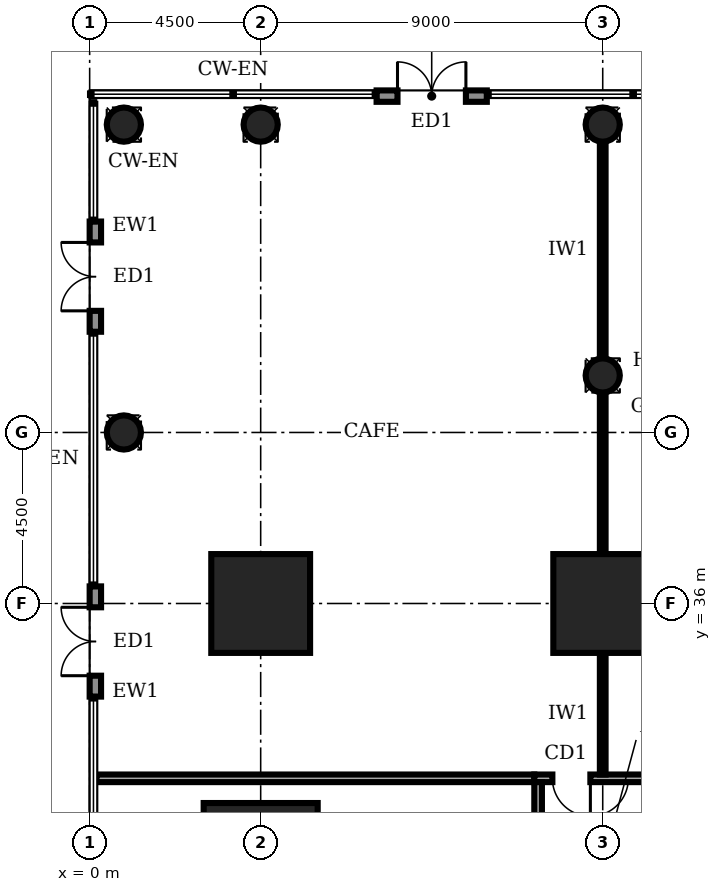
"""IFC4 building model, lengths in metres.
Left out: names, types, materials, properties, quantities, classifications, styles, units other than length and angle.
Written with IfcOpenShell. Run it as: python <this file> out.ifc"""

import sys

from ifc_helpers import new_model, si_unit, direction, frame, frame_2d, origin, origin_2d, place, context, subcontext, project, spatial, rectangle, circle, extrude, element, fill, save


model = new_model("IFC4")
c1 = context("Model", 3, precision=1e-05, world=origin(), true_north=direction((0.0, 1.0)))
c2 = subcontext(c1, "Body", "Model", "MODEL_VIEW")
j1 = project(units=[si_unit("LENGTHUNIT", "METRE"), si_unit("PLANEANGLEUNIT", "RADIAN")], contexts=[c1])
p1 = place(None, origin())
s1 = spatial("IfcSite", under=j1, at=p1, CompositionType="ELEMENT")
p2 = place(p1, origin())
s2 = spatial("IfcBuilding", under=s1, at=p2, CompositionType="ELEMENT")
p3 = place(p2, origin())
s3 = spatial("IfcBuildingStorey", under=s2, at=p3, CompositionType="ELEMENT", Elevation=0.0)
p4 = place(p3, frame((4.5, 29.25, -0.4), z_axis=(0.0, 0.0, 1.0), x_axis=(1.0, 0.0, 0.0)))
e1 = element("IfcColumn", 1, at=p4, inside=s3, PredefinedType="COLUMN", context=c2, shape_type="SweptSolid", body=[
    extrude(rectangle(XDim=3.0, YDim=3.0, at=origin_2d()), origin(), (0.0, 0.0, 1.0), 6.4),
])
for number, where, z_axis, x_axis in (
    (2, (4.5, 36.0, -0.4), (0.0, 0.0, 1.0), (1.0, 0.0, 0.0)),
    (3, (13.5, 36.0, -0.4), (0.0, 0.0, 1.0), (1.0, 0.0, 0.0)),
):
    element("IfcColumn", number, at=place(p3, frame(where, z_axis=z_axis, x_axis=x_axis)), inside=s3, PredefinedType="COLUMN", context=c2, shape_type="SweptSolid", body=[
        extrude(rectangle(XDim=2.6, YDim=2.6, at=origin_2d()), origin(), (0.0, 0.0, 1.0), 6.4),
    ])
for number, where, z_axis, x_axis in (
    (4, (0.9, 40.5, -0.4), (0.0, 0.0, 1.0), (1.0, 0.0, 0.0)),
    (5, (13.5, 42.0, -0.4), (0.0, 0.0, 1.0), (1.0, 0.0, 0.0)),
    (6, (0.9, 48.6, -0.4), (0.0, 0.0, 1.0), (1.0, 0.0, 0.0)),
    (7, (4.5, 48.6, -0.4), (0.0, 0.0, 1.0), (1.0, 0.0, 0.0)),
    (8, (13.5, 48.6, -0.4), (0.0, 0.0, 1.0), (1.0, 0.0, 0.0)),
):
    element("IfcColumn", number, at=place(p3, frame(where, z_axis=z_axis, x_axis=x_axis)), inside=s3, PredefinedType="COLUMN", context=c2, shape_type="SweptSolid", body=[
        extrude(circle(Radius=0.45, at=origin_2d()), origin(), (0.0, 0.0, 1.0), 6.4),
    ])
p5 = place(p3, frame((10.45, 49.35, 0.0), z_axis=(0.0, 0.0, 1.0), x_axis=(-1.0, 0.0, 0.0)))
e9 = element("IfcWall", 9, at=p5, inside=s3, PredefinedType="STANDARD", context=c2, shape_type="SweptSolid", body=[
    extrude(rectangle(XDim=2.9, YDim=0.3, at=frame_2d((1.45, 0.0))), origin(), (0.0, 0.0, 1.0), 5.7),
])
p6 = place(p5, frame((0.55, 0.0, 0.0)))
e10 = element("IfcOpeningElement", 10, at=p6, cuts=e9, PredefinedType="OPENING", context=c2, shape_type="SweptSolid", body=[
    extrude(rectangle(XDim=1.8, YDim=2.4, at=frame_2d((0.9, 1.2))), frame((0.0, 0.16, 0.0), z_axis=(0.0, -1.0, 0.0), x_axis=(1.0, 0.0, 0.0)), (0.0, 0.0, 1.0), 0.32),
])
p7 = place(p3, frame((0.15, 36.45, 0.0), z_axis=(0.0, 0.0, 1.0), x_axis=(0.0, -1.0, 0.0)))
e11 = element("IfcWall", 11, at=p7, inside=s3, PredefinedType="STANDARD", context=c2, shape_type="SweptSolid", body=[
    extrude(rectangle(XDim=2.9, YDim=0.3, at=frame_2d((1.45, 0.0))), origin(), (0.0, 0.0, 1.0), 5.7),
])
p8 = place(p7, frame((0.55, 0.0, 0.0)))
e12 = element("IfcOpeningElement", 12, at=p8, cuts=e11, PredefinedType="OPENING", context=c2, shape_type="SweptSolid", body=[
    extrude(rectangle(XDim=1.8, YDim=2.4, at=frame_2d((0.9, 1.2))), frame((0.0, 0.16, 0.0), z_axis=(0.0, -1.0, 0.0), x_axis=(1.0, 0.0, 0.0)), (0.0, 0.0, 1.0), 0.32),
])
p9 = place(p3, frame((0.15, 46.05, 0.0), z_axis=(0.0, 0.0, 1.0), x_axis=(0.0, -1.0, 0.0)))
e13 = element("IfcWall", 13, at=p9, inside=s3, PredefinedType="STANDARD", context=c2, shape_type="SweptSolid", body=[
    extrude(rectangle(XDim=2.9, YDim=0.3, at=frame_2d((1.45, 0.0))), origin(), (0.0, 0.0, 1.0), 5.7),
])
p10 = place(p9, frame((0.55, 0.0, 0.0)))
e14 = element("IfcOpeningElement", 14, at=p10, cuts=e13, PredefinedType="OPENING", context=c2, shape_type="SweptSolid", body=[
    extrude(rectangle(XDim=1.8, YDim=2.4, at=frame_2d((0.9, 1.2))), frame((0.0, 0.16, 0.0), z_axis=(0.0, -1.0, 0.0), x_axis=(1.0, 0.0, 0.0)), (0.0, 0.0, 1.0), 0.32),
])
p11 = place(p3, frame((28.6, 31.4, 0.0), z_axis=(0.0, 0.0, 1.0), x_axis=(-1.0, 0.0, 0.0)))
e15 = element("IfcWall", 15, at=p11, inside=s3, PredefinedType="SOLIDWALL", context=c2, shape_type="SweptSolid", body=[
    extrude(rectangle(XDim=16.9, YDim=0.2, at=frame_2d((8.45, 0.0))), origin(), (0.0, 0.0, 1.0), 5.7),
])
p12 = place(p11, frame((15.425, 0.0, 0.0)))
e16 = element("IfcOpeningElement", 16, at=p12, cuts=e15, PredefinedType="OPENING", context=c2, shape_type="SweptSolid", body=[
    extrude(rectangle(XDim=1.0, YDim=2.1, at=frame_2d((0.5, 1.05))), frame((0.0, 0.11, 0.0), z_axis=(0.0, -1.0, 0.0), x_axis=(1.0, 0.0, 0.0)), (0.0, 0.0, 1.0), 0.22),
])
p13 = place(p11, frame((7.45, 0.0, 0.0)))
e17 = element("IfcOpeningElement", 17, at=p13, cuts=e15, PredefinedType="OPENING", context=c2, shape_type="SweptSolid", body=[
    extrude(rectangle(XDim=1.8, YDim=2.1, at=frame_2d((0.9, 1.05))), frame((0.0, 0.11, 0.0), z_axis=(0.0, -1.0, 0.0), x_axis=(1.0, 0.0, 0.0)), (0.0, 0.0, 1.0), 0.22),
])
p14 = place(p11, frame((0.275, 0.0, 0.0)))
e18 = element("IfcOpeningElement", 18, at=p14, cuts=e15, PredefinedType="OPENING", context=c2, shape_type="SweptSolid", body=[
    extrude(rectangle(XDim=1.0, YDim=2.1, at=frame_2d((0.5, 1.05))), frame((0.0, 0.11, 0.0), z_axis=(0.0, -1.0, 0.0), x_axis=(1.0, 0.0, 0.0)), (0.0, 0.0, 1.0), 0.22),
])
p15 = place(p3, frame((11.8, 31.3, 0.0), z_axis=(0.0, 0.0, 1.0), x_axis=(0.0, -1.0, 0.0)))
e19 = element("IfcWall", 19, at=p15, inside=s3, PredefinedType="SOLIDWALL", context=c2, shape_type="SweptSolid", body=[
    extrude(rectangle(XDim=22.3, YDim=0.2, at=frame_2d((11.15, 0.0))), origin(), (0.0, 0.0, 1.0), 5.7),
])
p16 = place(p15, frame((19.55, 0.0, 0.0)))
e20 = element("IfcOpeningElement", 20, at=p16, cuts=e19, PredefinedType="OPENING", context=c2, shape_type="SweptSolid", body=[
    extrude(rectangle(XDim=1.0, YDim=2.1, at=frame_2d((0.5, 1.05))), frame((0.0, 0.11, 0.0), z_axis=(0.0, -1.0, 0.0), x_axis=(1.0, 0.0, 0.0)), (0.0, 0.0, 1.0), 0.22),
])
p17 = place(p15, frame((15.45, 0.0, 0.0)))
e21 = element("IfcOpeningElement", 21, at=p17, cuts=e19, PredefinedType="OPENING", context=c2, shape_type="SweptSolid", body=[
    extrude(rectangle(XDim=0.9, YDim=2.1, at=frame_2d((0.45, 1.05))), frame((0.0, 0.11, 0.0), z_axis=(0.0, -1.0, 0.0), x_axis=(1.0, 0.0, 0.0)), (0.0, 0.0, 1.0), 0.22),
])
p18 = place(p15, frame((12.45, 0.0, 0.0)))
e22 = element("IfcOpeningElement", 22, at=p18, cuts=e19, PredefinedType="OPENING", context=c2, shape_type="SweptSolid", body=[
    extrude(rectangle(XDim=0.9, YDim=2.1, at=frame_2d((0.45, 1.05))), frame((0.0, 0.11, 0.0), z_axis=(0.0, -1.0, 0.0), x_axis=(1.0, 0.0, 0.0)), (0.0, 0.0, 1.0), 0.22),
])
p19 = place(p15, frame((7.6, 0.0, 0.0)))
e23 = element("IfcOpeningElement", 23, at=p19, cuts=e19, PredefinedType="OPENING", context=c2, shape_type="SweptSolid", body=[
    extrude(rectangle(XDim=0.9, YDim=2.1, at=frame_2d((0.45, 1.05))), frame((0.0, 0.11, 0.0), z_axis=(0.0, -1.0, 0.0), x_axis=(1.0, 0.0, 0.0)), (0.0, 0.0, 1.0), 0.22),
])
p20 = place(p15, frame((4.8, 0.0, 0.0)))
e24 = element("IfcOpeningElement", 24, at=p20, cuts=e19, PredefinedType="OPENING", context=c2, shape_type="SweptSolid", body=[
    extrude(rectangle(XDim=1.0, YDim=2.1, at=frame_2d((0.5, 1.05))), frame((0.0, 0.11, 0.0), z_axis=(0.0, -1.0, 0.0), x_axis=(1.0, 0.0, 0.0)), (0.0, 0.0, 1.0), 0.22),
])
p21 = place(p15, frame((10.3, 0.0, 0.0)))
e25 = element("IfcOpeningElement", 25, at=p21, cuts=e19, PredefinedType="OPENING", context=c2, shape_type="SweptSolid", body=[
    extrude(rectangle(XDim=1.0, YDim=2.1, at=frame_2d((0.5, 1.05))), frame((0.0, 0.11, 0.0), z_axis=(0.0, -1.0, 0.0), x_axis=(1.0, 0.0, 0.0)), (0.0, 0.0, 1.0), 0.22),
])
p22 = place(p15, frame((1.55, 0.0, 0.0)))
e26 = element("IfcOpeningElement", 26, at=p22, cuts=e19, PredefinedType="OPENING", context=c2, shape_type="SweptSolid", body=[
    extrude(rectangle(XDim=1.0, YDim=2.1, at=frame_2d((0.5, 1.05))), frame((0.0, 0.11, 0.0), z_axis=(0.0, -1.0, 0.0), x_axis=(1.0, 0.0, 0.0)), (0.0, 0.0, 1.0), 0.22),
])
p23 = place(p3, frame((0.18, 31.4, 0.0), z_axis=(0.0, 0.0, 1.0), x_axis=(1.0, 0.0, 0.0)))
e27 = element("IfcWall", 27, at=p23, inside=s3, PredefinedType="SOLIDWALL", context=c2, shape_type="SweptSolid", body=[
    extrude(rectangle(XDim=11.52, YDim=0.2, at=frame_2d((5.76, 0.0))), origin(), (0.0, 0.0, 1.0), 5.7),
])
p24 = place(p3, frame((13.5, 31.5, 0.0), z_axis=(0.0, 0.0, 1.0), x_axis=(0.0, 1.0, 0.0)))
e28 = element("IfcWall", 28, at=p24, inside=s3, PredefinedType="PARTITIONING", context=c2, shape_type="SweptSolid", body=[
    extrude(rectangle(XDim=3.18, YDim=0.15, at=frame_2d((1.59, 0.0))), origin(), (0.0, 0.0, 1.0), 4.8),
])
p25 = place(p3, frame((13.5, 37.32, 0.0), z_axis=(0.0, 0.0, 1.0), x_axis=(0.0, 1.0, 0.0)))
e29 = element("IfcWall", 29, at=p25, inside=s3, PredefinedType="PARTITIONING", context=c2, shape_type="SweptSolid", body=[
    extrude(rectangle(XDim=4.21, YDim=0.15, at=frame_2d((2.105, 0.0))), origin(), (0.0, 0.0, 1.0), 4.7),
])
p26 = place(p3, frame((13.5, 42.47, 0.0), z_axis=(0.0, 0.0, 1.0), x_axis=(0.0, 1.0, 0.0)))
e30 = element("IfcWall", 30, at=p26, inside=s3, PredefinedType="PARTITIONING", context=c2, shape_type="SweptSolid", body=[
    extrude(rectangle(XDim=5.66, YDim=0.15, at=frame_2d((2.83, 0.0))), origin(), (0.0, 0.0, 1.0), 4.7),
])
p27 = place(p6, frame((1.8, 0.0, 0.0), z_axis=(0.0, 0.0, 1.0), x_axis=(-1.0, 0.0, 0.0)))
e31 = element("IfcDoor", 31, at=p27, inside=s3, OperationType="DOUBLE_DOOR_SINGLE_SWING", PredefinedType="DOOR", context=c2, shape_type="SweptSolid", body=[
    extrude(rectangle(XDim=1.8, YDim=2.4, at=frame_2d((0.9, 1.2))), frame((0.0, 0.025, 0.0), z_axis=(0.0, -1.0, 0.0), x_axis=(1.0, 0.0, 0.0)), (0.0, 0.0, 1.0), 0.05),
])
fill(e10, e31)
p28 = place(p8, frame((1.8, 0.0, 0.0), z_axis=(0.0, 0.0, 1.0), x_axis=(-1.0, 0.0, 0.0)))
e32 = element("IfcDoor", 32, at=p28, inside=s3, OperationType="DOUBLE_DOOR_SINGLE_SWING", PredefinedType="DOOR", context=c2, shape_type="SweptSolid", body=[
    extrude(rectangle(XDim=1.8, YDim=2.4, at=frame_2d((0.9, 1.2))), frame((0.0, 0.025, 0.0), z_axis=(0.0, -1.0, 0.0), x_axis=(1.0, 0.0, 0.0)), (0.0, 0.0, 1.0), 0.05),
])
fill(e12, e32)
p29 = place(p10, frame((1.8, 0.0, 0.0), z_axis=(0.0, 0.0, 1.0), x_axis=(-1.0, 0.0, 0.0)))
e33 = element("IfcDoor", 33, at=p29, inside=s3, OperationType="DOUBLE_DOOR_SINGLE_SWING", PredefinedType="DOOR", context=c2, shape_type="SweptSolid", body=[
    extrude(rectangle(XDim=1.8, YDim=2.4, at=frame_2d((0.9, 1.2))), frame((0.0, 0.025, 0.0), z_axis=(0.0, -1.0, 0.0), x_axis=(1.0, 0.0, 0.0)), (0.0, 0.0, 1.0), 0.05),
])
fill(e14, e33)
p30 = place(p12, origin())
e34 = element("IfcDoor", 34, at=p30, inside=s3, OperationType="SINGLE_SWING_LEFT", PredefinedType="DOOR", context=c2, shape_type="SweptSolid", body=[
    extrude(rectangle(XDim=1.0, YDim=2.1, at=frame_2d((0.5, 1.05))), frame((0.0, 0.025, 0.0), z_axis=(0.0, -1.0, 0.0), x_axis=(1.0, 0.0, 0.0)), (0.0, 0.0, 1.0), 0.05),
])
fill(e16, e34)
save(model, sys.argv[1])
